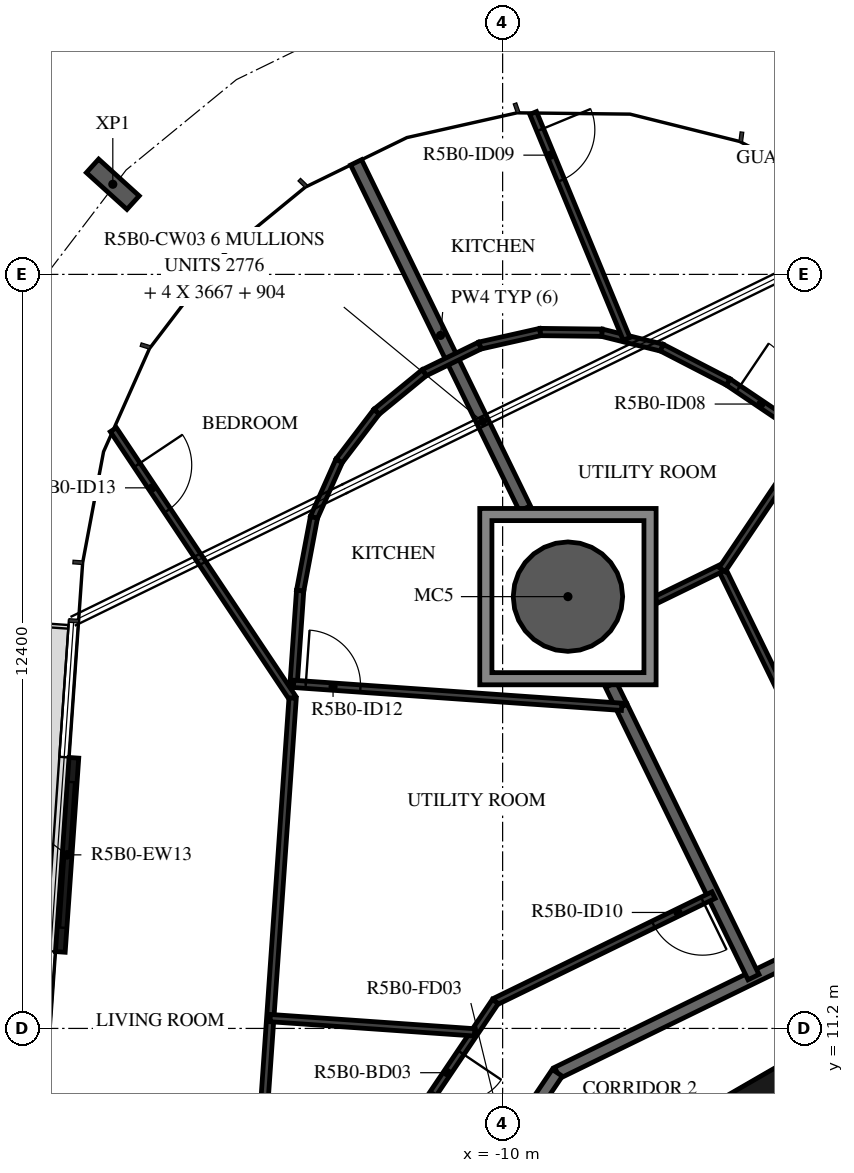
"""IFC4 building model, lengths in metres.
Left out: names, types, materials, properties, quantities, classifications, styles, units other than length and angle.
Written with IfcOpenShell. Run it as: python <this file> out.ifc"""

import sys

from ifc_helpers import new_model, si_unit, direction, frame, frame_2d, origin, origin_2d, place, context, subcontext, project, spatial, polyline, rectangle, hollow_circle, i_section, outline, extrude, element, fill, save


model = new_model("IFC4")
c1 = context("Model", 3, precision=1e-05, world=origin(), true_north=direction((0.0, 1.0)))
c2 = subcontext(c1, "Body", "Model", "MODEL_VIEW")
j1 = project(units=[si_unit("LENGTHUNIT", "METRE"), si_unit("PLANEANGLEUNIT", "RADIAN")], contexts=[c1])
p1 = place(None, origin())
s1 = spatial("IfcSite", under=j1, at=p1, CompositionType="ELEMENT")
p2 = place(p1, origin())
s2 = spatial("IfcBuilding", under=s1, at=p2, CompositionType="ELEMENT")
p3 = place(p2, frame((0.0, 0.0, 202.4)))
s3 = spatial("IfcBuildingStorey", under=s2, at=p3, CompositionType="ELEMENT", Elevation=202.4)
p4 = place(p3, frame((-8.926, 18.301, -0.38), z_axis=(0.0, 0.0, 1.0), x_axis=(1.0, 0.0, 0.0)))
e1 = element("IfcColumn", 1, at=p4, inside=s3, PredefinedType="COLUMN", context=c2, shape_type="SweptSolid", body=[
    extrude(hollow_circle(Radius=0.9, WallThickness=0.04, at=origin_2d()), origin(), (0.0, 0.0, 1.0), 3.5),
])
p5 = place(p3, frame((-16.411, 25.082, -0.38), z_axis=(0.0, 0.0, 1.0), x_axis=(0.671427897912, 0.741069887329, 0.0)))
e2 = element("IfcColumn", 2, at=p5, inside=s3, PredefinedType="COLUMN", context=c2, shape_type="SweptSolid", body=[
    extrude(i_section(OverallWidth=0.3, OverallDepth=0.9, WebThickness=0.019, FlangeThickness=0.035, FilletRadius=0.03, at=origin_2d()), origin(), (0.0, 0.0, 1.0), 3.5),
])
p6 = place(p3, frame((-17.051, 15.65, 0.0), z_axis=(0.0, 0.0, 1.0), x_axis=(-0.069734222855, -0.997565605944, 0.0)))
e3 = element("IfcWall", 3, at=p6, inside=s3, PredefinedType="STANDARD", context=c2, shape_type="SweptSolid", body=[
    extrude(rectangle(XDim=3.2, YDim=0.16, at=frame_2d((1.6, 0.0))), origin(), (0.0, 0.0, 1.0), 3.12),
])
p7 = place(p6, frame((0.4, 0.0, 0.0)))
e4 = element("IfcOpeningElement", 4, at=p7, cuts=e3, PredefinedType="OPENING", context=c2, shape_type="SweptSolid", body=[
    extrude(rectangle(XDim=2.4, YDim=2.4, at=frame_2d((1.2, 1.2))), frame((0.0, 0.09, 0.0), z_axis=(0.0, -1.0, 0.0), x_axis=(1.0, 0.0, 0.0)), (0.0, 0.0, 1.0), 0.18),
])
p8 = place(p3, frame((-4.51, 10.845, 0.0), z_axis=(0.0, 0.0, 1.0), x_axis=(-0.865975092491, -0.500087131594, 0.0)))
e5 = element("IfcWall", 5, at=p8, inside=s3, PredefinedType="SHEAR", context=c2, shape_type="SweptSolid", body=[
    extrude(rectangle(XDim=3.033, YDim=0.5, at=frame_2d((1.516, 0.0))), origin(), (0.0, 0.0, 1.0), 3.12),
])
p9 = place(p3, frame((-2.647, 13.618, 0.0), z_axis=(0.0, 0.0, 1.0), x_axis=(-0.898796543751, -0.438366026218, 0.0)))
e6 = element("IfcWall", 6, at=p9, inside=s3, PredefinedType="STANDARD", context=c2, shape_type="SweptSolid", body=[
    extrude(rectangle(XDim=7.181, YDim=0.2, at=frame_2d((3.591, 0.0))), origin(), (0.0, 0.0, 1.0), 3.12),
])
p10 = place(p3, frame((-9.101, 10.47, 0.0), z_axis=(0.0, 0.0, 1.0), x_axis=(-0.559195469534, -0.829035841718, 0.0)))
e7 = element("IfcWall", 7, at=p10, inside=s3, PredefinedType="STANDARD", context=c2, shape_type="SweptSolid", body=[
    extrude(rectangle(XDim=7.181, YDim=0.2, at=frame_2d((3.591, 0.0))), origin(), (0.0, 0.0, 1.0), 3.12),
])
p11 = place(p10, frame((1.0, 0.0, 0.0)))
e8 = element("IfcOpeningElement", 8, at=p11, cuts=e7, PredefinedType="OPENING", context=c2, shape_type="SweptSolid", body=[
    extrude(rectangle(XDim=1.0, YDim=2.1, at=frame_2d((0.5, 1.05))), frame((0.0, 0.11, 0.0), z_axis=(0.0, -1.0, 0.0), x_axis=(1.0, 0.0, 0.0)), (0.0, 0.0, 1.0), 0.22),
])
p12 = place(p3, frame((-8.042, 16.489, 0.0), z_axis=(0.0, 0.0, 1.0), x_axis=(0.438345825707, -0.898806395774, 0.0)))
e9 = element("IfcWall", 9, at=p12, inside=s3, PredefinedType="STANDARD", context=c2, shape_type="SweptSolid", body=[
    extrude(rectangle(XDim=4.946, YDim=0.2, at=frame_2d((2.473, 0.0))), origin(), (0.0, 0.0, 1.0), 3.12),
])
p13 = place(p3, frame((-8.219, 16.851, 0.0), z_axis=(0.0, 0.0, 1.0), x_axis=(0.438281645094, -0.898837693676, 0.0)))
e10 = element("IfcWall", 10, at=p13, inside=s3, PredefinedType="STANDARD", context=c2, shape_type="SweptSolid", body=[
    extrude(rectangle(XDim=0.373, YDim=0.2, at=frame_2d((0.186, 0.0))), origin(), (0.0, 0.0, 1.0), 3.12),
])
p14 = place(p3, frame((-12.409, 25.442, 0.0), z_axis=(0.0, 0.0, 1.0), x_axis=(0.43838641251, -0.898786600549, 0.0)))
e11 = element("IfcWall", 11, at=p14, inside=s3, PredefinedType="STANDARD", context=c2, shape_type="SweptSolid", body=[
    extrude(rectangle(XDim=6.333, YDim=0.2, at=frame_2d((3.166, 0.0))), origin(), (0.0, 0.0, 1.0), 3.12),
])
p15 = place(p3, frame((-4.308, 14.477, 0.0), z_axis=(0.0, 0.0, 1.0), x_axis=(-0.43837096777, 0.898794133613, 0.0)))
e12 = element("IfcWall", 12, at=p15, inside=s3, PredefinedType="PARTITIONING", context=c2, shape_type="SweptSolid", body=[
    extrude(rectangle(XDim=4.75, YDim=0.12, at=frame_2d((2.375, 0.0))), origin(), (0.0, 0.0, 1.0), 3.12),
])
p16 = place(p3, frame((-6.402, 18.771, 0.0), z_axis=(0.0, 0.0, 1.0), x_axis=(-0.898797905192, -0.438363234797, 0.0)))
e13 = element("IfcWall", 13, at=p16, inside=s3, PredefinedType="PARTITIONING", context=c2, shape_type="SweptSolid", body=[
    extrude(rectangle(XDim=1.195, YDim=0.12, at=frame_2d((0.597, 0.0))), origin(), (0.0, 0.0, 1.0), 3.12),
])
p17 = place(p3, frame((-6.292, 21.831, 0.0), z_axis=(0.0, 0.0, 1.0), x_axis=(0.829040041754, -0.559189242715, 0.0)))
e14 = element("IfcWall", 14, at=p17, inside=s3, PredefinedType="PARTITIONING", context=c2, shape_type="SweptSolid", body=[
    extrude(rectangle(XDim=12.879, YDim=0.12, at=frame_2d((6.439, 0.0))), origin(), (0.0, 0.0, 1.0), 3.12),
])
p18 = place(p17, frame((1.844, 0.0, 0.0)))
e15 = element("IfcOpeningElement", 15, at=p18, cuts=e14, PredefinedType="OPENING", context=c2, shape_type="SweptSolid", body=[
    extrude(rectangle(XDim=0.9, YDim=2.1, at=frame_2d((0.45, 1.05))), frame((0.0, 0.07, 0.0), z_axis=(0.0, -1.0, 0.0), x_axis=(1.0, 0.0, 0.0)), (0.0, 0.0, 1.0), 0.14),
])
p19 = place(p17, frame((0.2, 0.0, 0.0)))
e16 = element("IfcOpeningElement", 16, at=p19, cuts=e14, PredefinedType="OPENING", context=c2, shape_type="SweptSolid", body=[
    extrude(rectangle(XDim=0.9, YDim=2.1, at=frame_2d((0.45, 1.05))), frame((0.0, 0.07, 0.0), z_axis=(0.0, -1.0, 0.0), x_axis=(1.0, 0.0, 0.0)), (0.0, 0.0, 1.0), 0.14),
])
p20 = place(p3, frame((-8.367, 22.64, 0.0), z_axis=(0.0, 0.0, 1.0), x_axis=(0.970340073087, -0.241743960754, 0.0)))
e17 = element("IfcWall", 17, at=p20, inside=s3, PredefinedType="PARTITIONING", context=c2, shape_type="SweptSolid", body=[
    extrude(rectangle(XDim=1.016, YDim=0.12, at=frame_2d((0.508, 0.0))), origin(), (0.0, 0.0, 1.0), 3.12),
])
p21 = place(p3, frame((-7.382, 22.395, 0.0), z_axis=(0.0, 0.0, 1.0), x_axis=(0.888296031948, -0.459271335514, 0.0)))
e18 = element("IfcWall", 18, at=p21, inside=s3, PredefinedType="PARTITIONING", context=c2, shape_type="SweptSolid", body=[
    extrude(rectangle(XDim=1.227, YDim=0.12, at=frame_2d((0.613, 0.0))), origin(), (0.0, 0.0, 1.0), 3.12),
])
p22 = place(p3, frame((-9.498, 26.254, 0.0), z_axis=(0.0, 0.0, 1.0), x_axis=(0.38230709116, -0.924035328355, 0.0)))
e19 = element("IfcWall", 19, at=p22, inside=s3, PredefinedType="PARTITIONING", context=c2, shape_type="SweptSolid", body=[
    extrude(rectangle(XDim=4.02, YDim=0.12, at=frame_2d((2.01, 0.0))), origin(), (0.0, 0.0, 1.0), 3.12),
])
p23 = place(p22, frame((0.3, 0.0, 0.0)))
e20 = element("IfcOpeningElement", 20, at=p23, cuts=e19, PredefinedType="OPENING", context=c2, shape_type="SweptSolid", body=[
    extrude(rectangle(XDim=0.9, YDim=2.1, at=frame_2d((0.45, 1.05))), frame((0.0, 0.07, 0.0), z_axis=(0.0, -1.0, 0.0), x_axis=(1.0, 0.0, 0.0)), (0.0, 0.0, 1.0), 0.14),
])
p24 = place(p3, frame((-4.929, 20.912, 0.0), z_axis=(0.0, 0.0, 1.0), x_axis=(-0.559155109057, -0.829063063955, 0.0)))
e21 = element("IfcWall", 21, at=p24, inside=s3, PredefinedType="PARTITIONING", context=c2, shape_type="SweptSolid", body=[
    extrude(rectangle(XDim=2.613, YDim=0.12, at=frame_2d((1.307, 0.0))), origin(), (0.0, 0.0, 1.0), 3.12),
])
for number, where, z_axis, x_axis in (
    (22, (-8.367, 22.64, 0.0), (0.0, 0.0, 1.0), (-1.0, 0.012, 0.0)),
    (23, (-9.383, 22.652, 0.0), (0.0, 0.0, 1.0), (-0.976, -0.219, 0.0)),
):
    element("IfcWall", number, at=place(p3, frame(where, z_axis=z_axis, x_axis=x_axis)), inside=s3, PredefinedType="PARTITIONING", context=c2, shape_type="SweptSolid", body=[
        extrude(rectangle(XDim=1.016, YDim=0.12, at=frame_2d((0.508, 0.0))), origin(), (0.0, 0.0, 1.0), 3.12),
    ])
p25 = place(p3, frame((-10.375, 22.43, 0.0), z_axis=(0.0, 0.0, 1.0), x_axis=(-0.898710701911, -0.438541986895, 0.0)))
e24 = element("IfcWall", 24, at=p25, inside=s3, PredefinedType="PARTITIONING", context=c2, shape_type="SweptSolid", body=[
    extrude(rectangle(XDim=1.016, YDim=0.12, at=frame_2d((0.508, 0.0))), origin(), (0.0, 0.0, 1.0), 3.12),
])
p26 = place(p3, frame((-6.532, 13.392, 0.0), z_axis=(0.0, 0.0, 1.0), x_axis=(-0.898786663593, -0.438386283256, 0.0)))
e25 = element("IfcWall", 25, at=p26, inside=s3, PredefinedType="PARTITIONING", context=c2, shape_type="SweptSolid", body=[
    extrude(rectangle(XDim=3.992, YDim=0.12, at=frame_2d((1.996, 0.0))), origin(), (0.0, 0.0, 1.0), 3.12),
])
p27 = place(p26, frame((0.2, 0.0, 0.0)))
e26 = element("IfcOpeningElement", 26, at=p27, cuts=e25, PredefinedType="OPENING", context=c2, shape_type="SweptSolid", body=[
    extrude(rectangle(XDim=0.9, YDim=2.1, at=frame_2d((0.45, 1.05))), frame((0.0, 0.07, 0.0), z_axis=(0.0, -1.0, 0.0), x_axis=(1.0, 0.0, 0.0)), (0.0, 0.0, 1.0), 0.14),
])
p28 = place(p3, frame((-10.12, 11.642, 0.0), z_axis=(0.0, 0.0, 1.0), x_axis=(-0.559200431187, -0.829032494996, 0.0)))
e27 = element("IfcWall", 27, at=p28, inside=s3, PredefinedType="PARTITIONING", context=c2, shape_type="SweptSolid", body=[
    extrude(rectangle(XDim=6.973, YDim=0.12, at=frame_2d((3.487, 0.0))), origin(), (0.0, 0.0, 1.0), 3.12),
])
p29 = place(p28, frame((1.011, 0.0, 0.0)))
e28 = element("IfcOpeningElement", 28, at=p29, cuts=e27, PredefinedType="OPENING", context=c2, shape_type="SweptSolid", body=[
    extrude(rectangle(XDim=0.8, YDim=2.1, at=frame_2d((0.4, 1.05))), frame((0.0, 0.07, 0.0), z_axis=(0.0, -1.0, 0.0), x_axis=(1.0, 0.0, 0.0)), (0.0, 0.0, 1.0), 0.14),
])
for number, where, z_axis, x_axis in (
    (29, (-11.288, 21.984, 0.0), (0.0, 0.0, 1.0), (-0.774, -0.634, 0.0)),
    (30, (-12.073, 21.34, 0.0), (0.0, 0.0, 1.0), (-0.606, -0.795, 0.0)),
    (31, (-12.689, 20.532, 0.0), (0.0, 0.0, 1.0), (-0.407, -0.913, 0.0)),
):
    element("IfcWall", number, at=place(p3, frame(where, z_axis=z_axis, x_axis=x_axis)), inside=s3, PredefinedType="PARTITIONING", context=c2, shape_type="SweptSolid", body=[
        extrude(rectangle(XDim=1.016, YDim=0.12, at=frame_2d((0.508, 0.0))), origin(), (0.0, 0.0, 1.0), 3.12),
    ])
p30 = place(p3, frame((-13.103, 19.604, 0.0), z_axis=(0.0, 0.0, 1.0), x_axis=(-0.185045330455, -0.982729986149, 0.0)))
e32 = element("IfcWall", 32, at=p30, inside=s3, PredefinedType="PARTITIONING", context=c2, shape_type="SweptSolid", body=[
    extrude(rectangle(XDim=1.227, YDim=0.12, at=frame_2d((0.614, 0.0))), origin(), (0.0, 0.0, 1.0), 3.12),
])
p31 = place(p3, frame((-13.33, 18.399, 0.0), z_axis=(0.0, 0.0, 1.0), x_axis=(-0.069695040349, -0.9975683442, 0.0)))
e33 = element("IfcWall", 33, at=p31, inside=s3, PredefinedType="PARTITIONING", context=c2, shape_type="SweptSolid", body=[
    extrude(rectangle(XDim=1.576, YDim=0.12, at=frame_2d((0.788, 0.0))), origin(), (0.0, 0.0, 1.0), 3.12),
])
p32 = place(p3, frame((-13.437, 16.866, 0.0), z_axis=(0.0, 0.0, 1.0), x_axis=(0.997564592961, -0.06974871232, 0.0)))
e34 = element("IfcWall", 34, at=p32, inside=s3, PredefinedType="PARTITIONING", context=c2, shape_type="SweptSolid", body=[
    extrude(rectangle(XDim=5.408, YDim=0.12, at=frame_2d((2.704, 0.0))), origin(), (0.0, 0.0, 1.0), 3.12),
])
p33 = place(p32, frame((0.2, 0.0, 0.0)))
e35 = element("IfcOpeningElement", 35, at=p33, cuts=e34, PredefinedType="OPENING", context=c2, shape_type="SweptSolid", body=[
    extrude(rectangle(XDim=0.9, YDim=2.1, at=frame_2d((0.45, 1.05))), frame((0.0, 0.07, 0.0), z_axis=(0.0, -1.0, 0.0), x_axis=(1.0, 0.0, 0.0)), (0.0, 0.0, 1.0), 0.14),
])
p34 = place(p3, frame((-16.402, 21.046, 0.0), z_axis=(0.0, 0.0, 1.0), x_axis=(0.555442981062, -0.831554625259, 0.0)))
e36 = element("IfcWall", 36, at=p34, inside=s3, PredefinedType="PARTITIONING", context=c2, shape_type="SweptSolid", body=[
    extrude(rectangle(XDim=5.308, YDim=0.12, at=frame_2d((2.654, 0.0))), origin(), (0.0, 0.0, 1.0), 3.12),
])
p35 = place(p34, frame((0.7, 0.0, 0.0)))
e37 = element("IfcOpeningElement", 37, at=p35, cuts=e36, PredefinedType="OPENING", context=c2, shape_type="SweptSolid", body=[
    extrude(rectangle(XDim=0.9, YDim=2.1, at=frame_2d((0.45, 1.05))), frame((0.0, 0.07, 0.0), z_axis=(0.0, -1.0, 0.0), x_axis=(1.0, 0.0, 0.0)), (0.0, 0.0, 1.0), 0.14),
])
p36 = place(p3, frame((-13.453, 16.632, 0.0), z_axis=(0.0, 0.0, 1.0), x_axis=(-0.069757184581, -0.997564000553, 0.0)))
e38 = element("IfcWall", 38, at=p36, inside=s3, PredefinedType="PARTITIONING", context=c2, shape_type="SweptSolid", body=[
    extrude(rectangle(XDim=10.772, YDim=0.12, at=frame_2d((5.386, 0.0))), origin(), (0.0, 0.0, 1.0), 3.12),
])
p37 = place(p3, frame((-13.821, 11.37, 0.0), z_axis=(0.0, 0.0, 1.0), x_axis=(0.997559977048, -0.069814698975, 0.0)))
e39 = element("IfcWall", 39, at=p37, inside=s3, PredefinedType="PARTITIONING", context=c2, shape_type="SweptSolid", body=[
    extrude(rectangle(XDim=3.368, YDim=0.12, at=frame_2d((1.684, 0.0))), origin(), (0.0, 0.0, 1.0), 3.12),
])
p38 = place(p3, origin())
e40 = element("IfcWall", 40, at=p38, inside=s3, PredefinedType="STANDARD", context=c2, shape_type="SweptSolid", body=[
    extrude(outline(polyline([(-7.476, 19.751), (-7.476, 16.851), (-10.376, 16.851), (-10.376, 19.751), (-7.476, 19.751)]), holes=[polyline([(-10.176, 17.051), (-7.676, 17.051), (-7.676, 19.551), (-10.176, 19.551), (-10.176, 17.051)])]), origin(), (0.0, 0.0, 1.0), 3.12),
])
p39 = place(p7, origin())
e41 = element("IfcDoor", 41, at=p39, inside=s3, OperationType="DOUBLE_DOOR_SLIDING", PredefinedType="DOOR", context=c2, shape_type="SweptSolid", body=[
    extrude(rectangle(XDim=2.4, YDim=2.4, at=frame_2d((1.2, 1.2))), frame((0.0, 0.025, 0.0), z_axis=(0.0, -1.0, 0.0), x_axis=(1.0, 0.0, 0.0)), (0.0, 0.0, 1.0), 0.05),
])
fill(e4, e41)
p40 = place(p19, origin())
e42 = element("IfcDoor", 42, at=p40, inside=s3, OperationType="SINGLE_SWING_LEFT", PredefinedType="DOOR", context=c2, shape_type="SweptSolid", body=[
    extrude(rectangle(XDim=0.9, YDim=2.1, at=frame_2d((0.45, 1.05))), frame((0.0, 0.025, 0.0), z_axis=(0.0, -1.0, 0.0), x_axis=(1.0, 0.0, 0.0)), (0.0, 0.0, 1.0), 0.05),
])
fill(e16, e42)
p41 = place(p23, origin())
e43 = element("IfcDoor", 43, at=p41, inside=s3, OperationType="SINGLE_SWING_RIGHT", PredefinedType="DOOR", context=c2, shape_type="SweptSolid", body=[
    extrude(rectangle(XDim=0.9, YDim=2.1, at=frame_2d((0.45, 1.05))), frame((0.0, 0.025, 0.0), z_axis=(0.0, -1.0, 0.0), x_axis=(1.0, 0.0, 0.0)), (0.0, 0.0, 1.0), 0.05),
])
fill(e20, e43)
p42 = place(p27, origin())
e44 = element("IfcDoor", 44, at=p42, inside=s3, OperationType="SINGLE_SWING_LEFT", PredefinedType="DOOR", context=c2, shape_type="SweptSolid", body=[
    extrude(rectangle(XDim=0.9, YDim=2.1, at=frame_2d((0.45, 1.05))), frame((0.0, 0.025, 0.0), z_axis=(0.0, -1.0, 0.0), x_axis=(1.0, 0.0, 0.0)), (0.0, 0.0, 1.0), 0.05),
])
fill(e26, e44)
p43 = place(p29, origin())
e45 = element("IfcDoor", 45, at=p43, inside=s3, OperationType="SINGLE_SWING_LEFT", PredefinedType="DOOR", context=c2, shape_type="SweptSolid", body=[
    extrude(rectangle(XDim=0.8, YDim=2.1, at=frame_2d((0.4, 1.05))), frame((0.0, 0.025, 0.0), z_axis=(0.0, -1.0, 0.0), x_axis=(1.0, 0.0, 0.0)), (0.0, 0.0, 1.0), 0.05),
])
fill(e28, e45)
p44 = place(p33, origin())
e46 = element("IfcDoor", 46, at=p44, inside=s3, OperationType="SINGLE_SWING_LEFT", PredefinedType="DOOR", context=c2, shape_type="SweptSolid", body=[
    extrude(rectangle(XDim=0.9, YDim=2.1, at=frame_2d((0.45, 1.05))), frame((0.0, 0.025, 0.0), z_axis=(0.0, -1.0, 0.0), x_axis=(1.0, 0.0, 0.0)), (0.0, 0.0, 1.0), 0.05),
])
fill(e35, e46)
p45 = place(p35, origin())
e47 = element("IfcDoor", 47, at=p45, inside=s3, OperationType="SINGLE_SWING_LEFT", PredefinedType="DOOR", context=c2, shape_type="SweptSolid", body=[
    extrude(rectangle(XDim=0.9, YDim=2.1, at=frame_2d((0.45, 1.05))), frame((0.0, 0.025, 0.0), z_axis=(0.0, -1.0, 0.0), x_axis=(1.0, 0.0, 0.0)), (0.0, 0.0, 1.0), 0.05),
])
fill(e37, e47)
save(model, sys.argv[1])
